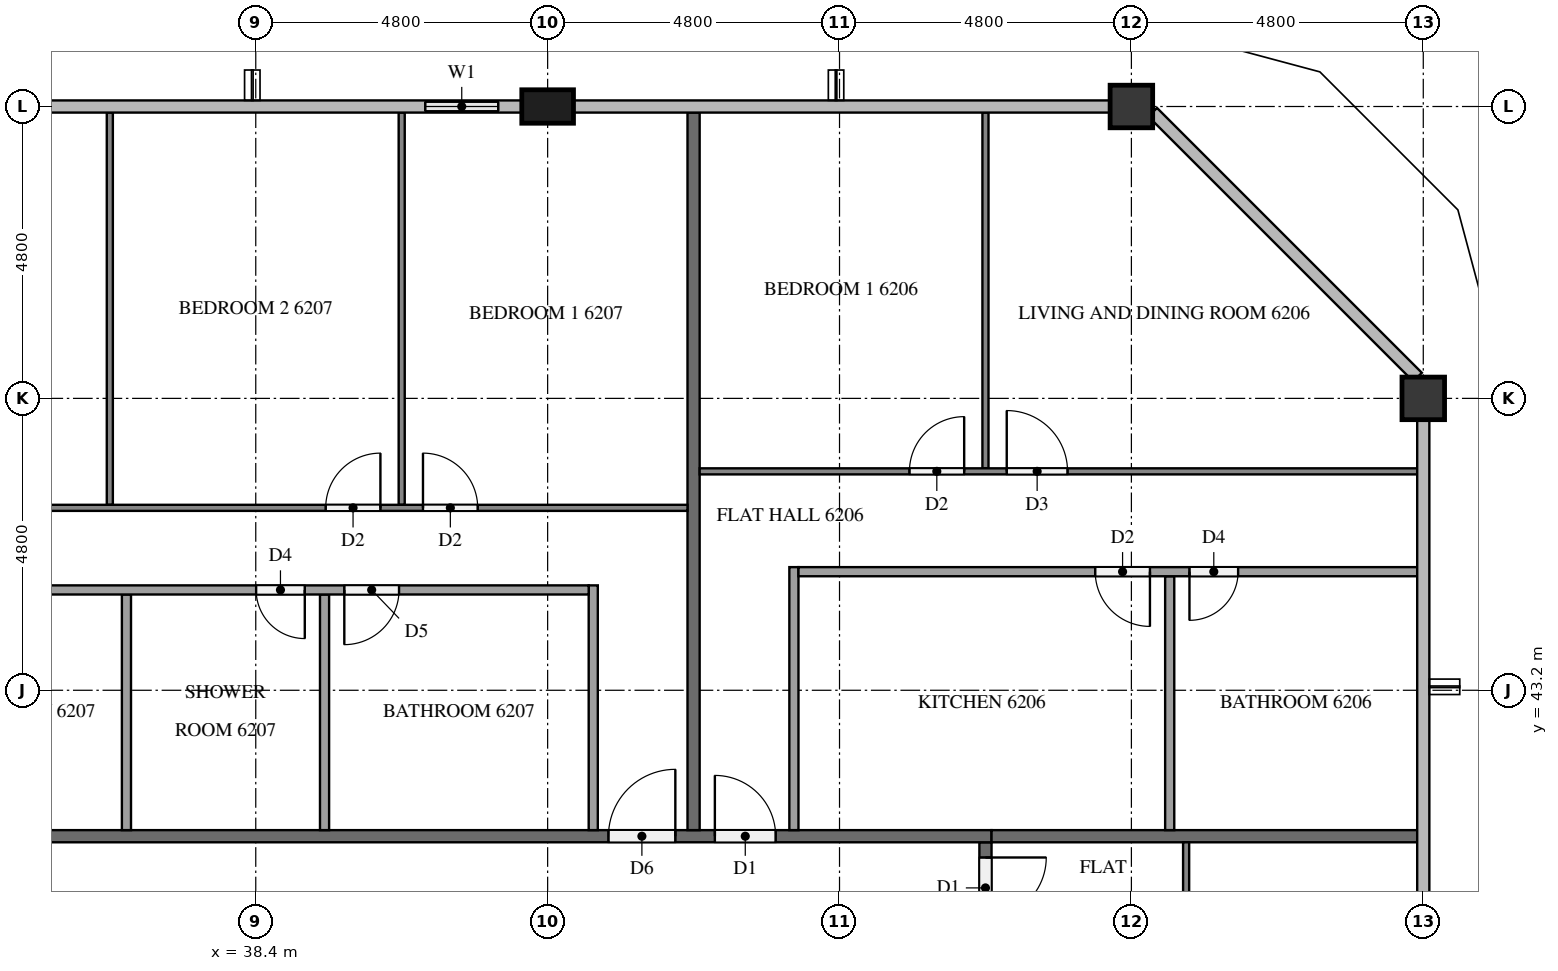
"""IFC4 building model, lengths in metres.
Left out: names, types, materials, properties, quantities, classifications, styles, units other than length and angle.
Written with IfcOpenShell. Run it as: python <this file> out.ifc"""

import sys

from ifc_helpers import new_model, si_unit, direction, frame, frame_2d, origin, origin_2d, place, context, subcontext, project, spatial, rectangle, extrude, element, fill, save


model = new_model("IFC4")
c1 = context("Model", 3, precision=1e-05, world=origin(), true_north=direction((0.0, 1.0)))
c2 = subcontext(c1, "Body", "Model", "MODEL_VIEW")
j1 = project(units=[si_unit("LENGTHUNIT", "METRE"), si_unit("PLANEANGLEUNIT", "RADIAN")], contexts=[c1])
p1 = place(None, origin())
s1 = spatial("IfcSite", under=j1, at=p1, CompositionType="ELEMENT")
p2 = place(p1, origin())
s2 = spatial("IfcBuilding", under=s1, at=p2, CompositionType="ELEMENT")
p3 = place(p2, frame((0.0, 0.0, 238.7)))
s3 = spatial("IfcBuildingStorey", under=s2, at=p3, CompositionType="ELEMENT", Elevation=238.7)
for number, where, z_axis, x_axis in (
    (1, (57.6, 48.0, 0.0), (0.0, 0.0, 1.0), (1.0, 0.0, 0.0)),
    (2, (52.8, 52.8, 0.0), (0.0, 0.0, 1.0), (1.0, 0.0, 0.0)),
):
    element("IfcColumn", number, at=place(p3, frame(where, z_axis=z_axis, x_axis=x_axis)), inside=s3, PredefinedType="COLUMN", context=c2, shape_type="SweptSolid", body=[
        extrude(rectangle(XDim=0.7, YDim=0.7, at=origin_2d()), origin(), (0.0, 0.0, 1.0), 3.2),
    ])
p4 = place(p3, frame((43.2, 52.8, 0.0), z_axis=(0.0, 0.0, 1.0), x_axis=(1.0, 0.0, 0.0)))
e3 = element("IfcColumn", 3, at=p4, inside=s3, PredefinedType="COLUMN", context=c2, shape_type="SweptSolid", body=[
    extrude(rectangle(XDim=0.85, YDim=0.55, at=origin_2d()), origin(), (0.0, 0.0, 1.0), 3.2),
])
p5 = place(p3, frame((42.775, 52.8, 0.0), z_axis=(0.0, 0.0, 1.0), x_axis=(-1.0, 0.0, 0.0)))
e4 = element("IfcWall", 4, at=p5, inside=s3, PredefinedType="SOLIDWALL", context=c2, shape_type="SweptSolid", body=[
    extrude(rectangle(XDim=1.975, YDim=0.15, at=frame_2d((0.987, 0.0))), origin(), (0.0, 0.0, 1.0), 3.2),
])
p6 = place(p5, frame((0.387, 0.0, 0.9)))
e5 = element("IfcOpeningElement", 5, at=p6, cuts=e4, PredefinedType="OPENING", context=c2, shape_type="SweptSolid", body=[
    extrude(rectangle(XDim=1.2, YDim=1.4, at=frame_2d((0.6, 0.7))), frame((0.0, 0.085, 0.0), z_axis=(0.0, -1.0, 0.0), x_axis=(1.0, 0.0, 0.0)), (0.0, 0.0, 1.0), 0.17),
])
p7 = place(p3, frame((50.4, 40.7, 0.0), z_axis=(0.0, 0.0, 1.0), x_axis=(0.0, -1.0, 0.0)))
e6 = element("IfcWall", 6, at=p7, inside=s3, PredefinedType="PARTITIONING", context=c2, shape_type="SweptSolid", body=[
    extrude(rectangle(XDim=28.6, YDim=0.2, at=frame_2d((14.3, 0.0))), origin(), (0.0, 0.0, 1.0), 3.2),
])
p8 = place(p7, frame((27.3, 0.0, 0.0)))
e7 = element("IfcOpeningElement", 7, at=p8, cuts=e6, PredefinedType="OPENING", context=c2, shape_type="SweptSolid", body=[
    extrude(rectangle(XDim=1.1, YDim=2.1, at=frame_2d((0.55, 1.05))), frame((0.0, 0.11, 0.0), z_axis=(0.0, -1.0, 0.0), x_axis=(1.0, 0.0, 0.0)), (0.0, 0.0, 1.0), 0.22),
])
p9 = place(p7, frame((0.25, 0.0, 0.0)))
e8 = element("IfcOpeningElement", 8, at=p9, cuts=e6, PredefinedType="OPENING", context=c2, shape_type="SweptSolid", body=[
    extrude(rectangle(XDim=1.0, YDim=2.1, at=frame_2d((0.5, 1.05))), frame((0.0, 0.11, 0.0), z_axis=(0.0, -1.0, 0.0), x_axis=(1.0, 0.0, 0.0)), (0.0, 0.0, 1.0), 0.22),
])
p10 = place(p3, frame((11.9, 40.8, 0.0), z_axis=(0.0, 0.0, 1.0), x_axis=(1.0, 0.0, 0.0)))
e9 = element("IfcWall", 9, at=p10, inside=s3, PredefinedType="PARTITIONING", context=c2, shape_type="SweptSolid", body=[
    extrude(rectangle(XDim=38.6, YDim=0.2, at=frame_2d((19.3, 0.0))), origin(), (0.0, 0.0, 1.0), 3.2),
])
p11 = place(p10, frame((34.05, 0.0, 0.0)))
e10 = element("IfcOpeningElement", 10, at=p11, cuts=e9, PredefinedType="OPENING", context=c2, shape_type="SweptSolid", body=[
    extrude(rectangle(XDim=1.0, YDim=2.1, at=frame_2d((0.5, 1.05))), frame((0.0, 0.11, 0.0), z_axis=(0.0, -1.0, 0.0), x_axis=(1.0, 0.0, 0.0)), (0.0, 0.0, 1.0), 0.22),
])
p12 = place(p10, frame((32.3, 0.0, 0.0)))
e11 = element("IfcOpeningElement", 11, at=p12, cuts=e9, PredefinedType="OPENING", context=c2, shape_type="SweptSolid", body=[
    extrude(rectangle(XDim=1.1, YDim=2.1, at=frame_2d((0.55, 1.05))), frame((0.0, 0.11, 0.0), z_axis=(0.0, -1.0, 0.0), x_axis=(1.0, 0.0, 0.0)), (0.0, 0.0, 1.0), 0.22),
])
p13 = place(p10, frame((2.85, 0.0, 0.0)))
e12 = element("IfcOpeningElement", 12, at=p13, cuts=e9, PredefinedType="OPENING", context=c2, shape_type="SweptSolid", body=[
    extrude(rectangle(XDim=1.0, YDim=2.1, at=frame_2d((0.5, 1.05))), frame((0.0, 0.11, 0.0), z_axis=(0.0, -1.0, 0.0), x_axis=(1.0, 0.0, 0.0)), (0.0, 0.0, 1.0), 0.22),
])
p14 = place(p10, frame((1.15, 0.0, 0.0)))
e13 = element("IfcOpeningElement", 13, at=p14, cuts=e9, PredefinedType="OPENING", context=c2, shape_type="SweptSolid", body=[
    extrude(rectangle(XDim=1.0, YDim=2.1, at=frame_2d((0.5, 1.05))), frame((0.0, 0.11, 0.0), z_axis=(0.0, -1.0, 0.0), x_axis=(1.0, 0.0, 0.0)), (0.0, 0.0, 1.0), 0.22),
])
p15 = place(p3, frame((50.5, 40.8, 0.0), z_axis=(0.0, 0.0, 1.0), x_axis=(1.0, 0.0, 0.0)))
e14 = element("IfcWall", 14, at=p15, inside=s3, PredefinedType="PARTITIONING", context=c2, shape_type="SweptSolid", body=[
    extrude(rectangle(XDim=7.0, YDim=0.2, at=frame_2d((3.5, 0.0))), origin(), (0.0, 0.0, 1.0), 3.2),
])
p16 = place(p3, frame((45.6, 52.7, 0.0), z_axis=(0.0, 0.0, 1.0), x_axis=(0.0, -1.0, 0.0)))
e15 = element("IfcWall", 15, at=p16, inside=s3, PredefinedType="PARTITIONING", context=c2, shape_type="SweptSolid", body=[
    extrude(rectangle(XDim=11.8, YDim=0.2, at=frame_2d((5.9, 0.0))), origin(), (0.0, 0.0, 1.0), 3.2),
])
p17 = place(p3, frame((53.7, 40.7, 0.0), z_axis=(0.0, 0.0, 1.0), x_axis=(0.0, -1.0, 0.0)))
e16 = element("IfcWall", 16, at=p17, inside=s3, PredefinedType="PARTITIONING", context=c2, shape_type="SweptSolid", body=[
    extrude(rectangle(XDim=9.4, YDim=0.1, at=frame_2d((4.7, 0.0))), origin(), (0.0, 0.0, 1.0), 3.2),
])
p18 = place(p17, frame((3.45, 0.0, 0.0)))
e17 = element("IfcOpeningElement", 17, at=p18, cuts=e16, PredefinedType="OPENING", context=c2, shape_type="SweptSolid", body=[
    extrude(rectangle(XDim=0.9, YDim=2.1, at=frame_2d((0.45, 1.05))), frame((0.0, 0.06, 0.0), z_axis=(0.0, -1.0, 0.0), x_axis=(1.0, 0.0, 0.0)), (0.0, 0.0, 1.0), 0.12),
])
p19 = place(p17, frame((5.05, 0.0, 0.0)))
e18 = element("IfcOpeningElement", 18, at=p19, cuts=e16, PredefinedType="OPENING", context=c2, shape_type="SweptSolid", body=[
    extrude(rectangle(XDim=1.0, YDim=2.1, at=frame_2d((0.5, 1.05))), frame((0.0, 0.06, 0.0), z_axis=(0.0, -1.0, 0.0), x_axis=(1.0, 0.0, 0.0)), (0.0, 0.0, 1.0), 0.12),
])
p20 = place(p3, frame((50.4, 46.85, 0.0), z_axis=(0.0, 0.0, 1.0), x_axis=(0.0, 1.0, 0.0)))
e19 = element("IfcWall", 19, at=p20, inside=s3, PredefinedType="PARTITIONING", context=c2, shape_type="SweptSolid", body=[
    extrude(rectangle(XDim=5.85, YDim=0.1, at=frame_2d((2.925, 0.0))), origin(), (0.0, 0.0, 1.0), 3.2),
])
p21 = place(p3, frame((45.7, 46.8, 0.0), z_axis=(0.0, 0.0, 1.0), x_axis=(1.0, 0.0, 0.0)))
e20 = element("IfcWall", 20, at=p21, inside=s3, PredefinedType="PARTITIONING", context=c2, shape_type="SweptSolid", body=[
    extrude(rectangle(XDim=11.8, YDim=0.1, at=frame_2d((5.9, 0.0))), origin(), (0.0, 0.0, 1.0), 3.2),
])
p22 = place(p21, frame((3.45, 0.0, 0.0)))
e21 = element("IfcOpeningElement", 21, at=p22, cuts=e20, PredefinedType="OPENING", context=c2, shape_type="SweptSolid", body=[
    extrude(rectangle(XDim=0.9, YDim=2.1, at=frame_2d((0.45, 1.05))), frame((0.0, 0.06, 0.0), z_axis=(0.0, -1.0, 0.0), x_axis=(1.0, 0.0, 0.0)), (0.0, 0.0, 1.0), 0.12),
])
p23 = place(p21, frame((5.05, 0.0, 0.0)))
e22 = element("IfcOpeningElement", 22, at=p23, cuts=e20, PredefinedType="OPENING", context=c2, shape_type="SweptSolid", body=[
    extrude(rectangle(XDim=1.0, YDim=2.1, at=frame_2d((0.5, 1.05))), frame((0.0, 0.06, 0.0), z_axis=(0.0, -1.0, 0.0), x_axis=(1.0, 0.0, 0.0)), (0.0, 0.0, 1.0), 0.12),
])
p24 = place(p3, frame((53.43, 40.9, 0.0), z_axis=(0.0, 0.0, 1.0), x_axis=(0.0, 1.0, 0.0)))
e23 = element("IfcWall", 23, at=p24, inside=s3, PredefinedType="PARTITIONING", context=c2, shape_type="SweptSolid", body=[
    extrude(rectangle(XDim=4.175, YDim=0.15, at=frame_2d((2.087, 0.0))), origin(), (0.0, 0.0, 1.0), 3.2),
])
p25 = place(p3, frame((47.25, 40.9, 0.0), z_axis=(0.0, 0.0, 1.0), x_axis=(0.0, 1.0, 0.0)))
e24 = element("IfcWall", 24, at=p25, inside=s3, PredefinedType="PARTITIONING", context=c2, shape_type="SweptSolid", body=[
    extrude(rectangle(XDim=4.325, YDim=0.15, at=frame_2d((2.163, 0.0))), origin(), (0.0, 0.0, 1.0), 3.2),
])
p26 = place(p3, frame((57.5, 45.15, 0.0), z_axis=(0.0, 0.0, 1.0), x_axis=(-1.0, 0.0, 0.0)))
e25 = element("IfcWall", 25, at=p26, inside=s3, PredefinedType="PARTITIONING", context=c2, shape_type="SweptSolid", body=[
    extrude(rectangle(XDim=10.175, YDim=0.15, at=frame_2d((5.087, 0.0))), origin(), (0.0, 0.0, 1.0), 3.2),
])
p27 = place(p26, frame((4.395, 0.0, 0.0)))
e26 = element("IfcOpeningElement", 26, at=p27, cuts=e25, PredefinedType="OPENING", context=c2, shape_type="SweptSolid", body=[
    extrude(rectangle(XDim=0.9, YDim=2.1, at=frame_2d((0.45, 1.05))), frame((0.0, 0.085, 0.0), z_axis=(0.0, -1.0, 0.0), x_axis=(1.0, 0.0, 0.0)), (0.0, 0.0, 1.0), 0.17),
])
p28 = place(p26, frame((2.945, 0.0, 0.0)))
e27 = element("IfcOpeningElement", 27, at=p28, cuts=e25, PredefinedType="OPENING", context=c2, shape_type="SweptSolid", body=[
    extrude(rectangle(XDim=0.8, YDim=2.1, at=frame_2d((0.4, 1.05))), frame((0.0, 0.085, 0.0), z_axis=(0.0, -1.0, 0.0), x_axis=(1.0, 0.0, 0.0)), (0.0, 0.0, 1.0), 0.17),
])
for number, where, z_axis, x_axis in (
    (28, (40.8, 46.25, 0.0), (0.0, 0.0, 1.0), (0.0, 1.0, 0.0)),
    (29, (36.0, 46.25, 0.0), (0.0, 0.0, 1.0), (0.0, 1.0, 0.0)),
):
    element("IfcWall", number, at=place(p3, frame(where, z_axis=z_axis, x_axis=x_axis)), inside=s3, PredefinedType="PARTITIONING", context=c2, shape_type="SweptSolid", body=[
        extrude(rectangle(XDim=6.45, YDim=0.1, at=frame_2d((3.225, 0.0))), origin(), (0.0, 0.0, 1.0), 3.2),
    ])
p29 = place(p3, frame((26.5, 46.2, 0.0), z_axis=(0.0, 0.0, 1.0), x_axis=(1.0, 0.0, 0.0)))
e30 = element("IfcWall", 30, at=p29, inside=s3, PredefinedType="PARTITIONING", context=c2, shape_type="SweptSolid", body=[
    extrude(rectangle(XDim=19.0, YDim=0.1, at=frame_2d((9.5, 0.0))), origin(), (0.0, 0.0, 1.0), 3.2),
])
p30 = place(p29, frame((14.65, 0.0, 0.0)))
e31 = element("IfcOpeningElement", 31, at=p30, cuts=e30, PredefinedType="OPENING", context=c2, shape_type="SweptSolid", body=[
    extrude(rectangle(XDim=0.9, YDim=2.1, at=frame_2d((0.45, 1.05))), frame((0.0, 0.06, 0.0), z_axis=(0.0, -1.0, 0.0), x_axis=(1.0, 0.0, 0.0)), (0.0, 0.0, 1.0), 0.12),
])
p31 = place(p29, frame((13.05, 0.0, 0.0)))
e32 = element("IfcOpeningElement", 32, at=p31, cuts=e30, PredefinedType="OPENING", context=c2, shape_type="SweptSolid", body=[
    extrude(rectangle(XDim=0.9, YDim=2.1, at=frame_2d((0.45, 1.05))), frame((0.0, 0.06, 0.0), z_axis=(0.0, -1.0, 0.0), x_axis=(1.0, 0.0, 0.0)), (0.0, 0.0, 1.0), 0.12),
])
p32 = place(p29, frame((5.05, 0.0, 0.0)))
e33 = element("IfcOpeningElement", 33, at=p32, cuts=e30, PredefinedType="OPENING", context=c2, shape_type="SweptSolid", body=[
    extrude(rectangle(XDim=0.9, YDim=2.1, at=frame_2d((0.45, 1.05))), frame((0.0, 0.06, 0.0), z_axis=(0.0, -1.0, 0.0), x_axis=(1.0, 0.0, 0.0)), (0.0, 0.0, 1.0), 0.12),
])
p33 = place(p29, frame((3.35, 0.0, 0.0)))
e34 = element("IfcOpeningElement", 34, at=p33, cuts=e30, PredefinedType="OPENING", context=c2, shape_type="SweptSolid", body=[
    extrude(rectangle(XDim=1.0, YDim=2.1, at=frame_2d((0.5, 1.05))), frame((0.0, 0.06, 0.0), z_axis=(0.0, -1.0, 0.0), x_axis=(1.0, 0.0, 0.0)), (0.0, 0.0, 1.0), 0.12),
])
for number, where, z_axis, x_axis in (
    (35, (39.531, 40.9, 0.0), (0.0, 0.0, 1.0), (0.0, 1.0, 0.0)),
    (36, (36.273, 40.9, 0.0), (0.0, 0.0, 1.0), (0.0, 1.0, 0.0)),
):
    element("IfcWall", number, at=place(p3, frame(where, z_axis=z_axis, x_axis=x_axis)), inside=s3, PredefinedType="PARTITIONING", context=c2, shape_type="SweptSolid", body=[
        extrude(rectangle(XDim=3.875, YDim=0.15, at=frame_2d((1.938, 0.0))), origin(), (0.0, 0.0, 1.0), 3.2),
    ])
p34 = place(p3, frame((43.95, 40.9, 0.0), z_axis=(0.0, 0.0, 1.0), x_axis=(0.0, 1.0, 0.0)))
e37 = element("IfcWall", 37, at=p34, inside=s3, PredefinedType="PARTITIONING", context=c2, shape_type="SweptSolid", body=[
    extrude(rectangle(XDim=4.025, YDim=0.15, at=frame_2d((2.013, 0.0))), origin(), (0.0, 0.0, 1.0), 3.2),
])
p35 = place(p3, frame((43.875, 44.85, 0.0), z_axis=(0.0, 0.0, 1.0), x_axis=(-1.0, 0.0, 0.0)))
e38 = element("IfcWall", 38, at=p35, inside=s3, PredefinedType="PARTITIONING", context=c2, shape_type="SweptSolid", body=[
    extrude(rectangle(XDim=17.375, YDim=0.15, at=frame_2d((8.688, 0.0))), origin(), (0.0, 0.0, 1.0), 3.2),
])
p36 = place(p35, frame((3.119, 0.0, 0.0)))
e39 = element("IfcOpeningElement", 39, at=p36, cuts=e38, PredefinedType="OPENING", context=c2, shape_type="SweptSolid", body=[
    extrude(rectangle(XDim=0.9, YDim=2.1, at=frame_2d((0.45, 1.05))), frame((0.0, 0.085, 0.0), z_axis=(0.0, -1.0, 0.0), x_axis=(1.0, 0.0, 0.0)), (0.0, 0.0, 1.0), 0.17),
])
p37 = place(p35, frame((4.669, 0.0, 0.0)))
e40 = element("IfcOpeningElement", 40, at=p37, cuts=e38, PredefinedType="OPENING", context=c2, shape_type="SweptSolid", body=[
    extrude(rectangle(XDim=0.8, YDim=2.1, at=frame_2d((0.4, 1.05))), frame((0.0, 0.085, 0.0), z_axis=(0.0, -1.0, 0.0), x_axis=(1.0, 0.0, 0.0)), (0.0, 0.0, 1.0), 0.17),
])
p38 = place(p35, frame((9.734, 0.0, 0.0)))
e41 = element("IfcOpeningElement", 41, at=p38, cuts=e38, PredefinedType="OPENING", context=c2, shape_type="SweptSolid", body=[
    extrude(rectangle(XDim=0.8, YDim=2.1, at=frame_2d((0.4, 1.05))), frame((0.0, 0.085, 0.0), z_axis=(0.0, -1.0, 0.0), x_axis=(1.0, 0.0, 0.0)), (0.0, 0.0, 1.0), 0.17),
])
p39 = place(p35, frame((11.184, 0.0, 0.0)))
e42 = element("IfcOpeningElement", 42, at=p39, cuts=e38, PredefinedType="OPENING", context=c2, shape_type="SweptSolid", body=[
    extrude(rectangle(XDim=0.9, YDim=2.1, at=frame_2d((0.45, 1.05))), frame((0.0, 0.085, 0.0), z_axis=(0.0, -1.0, 0.0), x_axis=(1.0, 0.0, 0.0)), (0.0, 0.0, 1.0), 0.17),
])
p40 = place(p6, origin())
e43 = element("IfcWindow", 43, at=p40, inside=s3, PartitioningType="SINGLE_PANEL", PredefinedType="WINDOW", context=c2, shape_type="SweptSolid", body=[
    extrude(rectangle(XDim=1.2, YDim=1.4, at=frame_2d((0.6, 0.7))), frame((0.0, 0.03, 0.0), z_axis=(0.0, -1.0, 0.0), x_axis=(1.0, 0.0, 0.0)), (0.0, 0.0, 1.0), 0.06),
])
fill(e5, e43)
p41 = place(p9, origin())
e44 = element("IfcDoor", 44, at=p41, inside=s3, OperationType="SINGLE_SWING_LEFT", PredefinedType="DOOR", context=c2, shape_type="SweptSolid", body=[
    extrude(rectangle(XDim=1.0, YDim=2.1, at=frame_2d((0.5, 1.05))), frame((0.0, 0.025, 0.0), z_axis=(0.0, -1.0, 0.0), x_axis=(1.0, 0.0, 0.0)), (0.0, 0.0, 1.0), 0.05),
])
fill(e8, e44)
p42 = place(p11, origin())
e45 = element("IfcDoor", 45, at=p42, inside=s3, OperationType="SINGLE_SWING_LEFT", PredefinedType="DOOR", context=c2, shape_type="SweptSolid", body=[
    extrude(rectangle(XDim=1.0, YDim=2.1, at=frame_2d((0.5, 1.05))), frame((0.0, 0.025, 0.0), z_axis=(0.0, -1.0, 0.0), x_axis=(1.0, 0.0, 0.0)), (0.0, 0.0, 1.0), 0.05),
])
fill(e10, e45)
p43 = place(p12, origin())
e46 = element("IfcDoor", 46, at=p43, inside=s3, OperationType="SINGLE_SWING_RIGHT", PredefinedType="DOOR", context=c2, shape_type="SweptSolid", body=[
    extrude(rectangle(XDim=1.1, YDim=2.1, at=frame_2d((0.55, 1.05))), frame((0.0, 0.025, 0.0), z_axis=(0.0, -1.0, 0.0), x_axis=(1.0, 0.0, 0.0)), (0.0, 0.0, 1.0), 0.05),
])
fill(e11, e46)
p44 = place(p22, origin())
e47 = element("IfcDoor", 47, at=p44, inside=s3, OperationType="SINGLE_SWING_RIGHT", PredefinedType="DOOR", context=c2, shape_type="SweptSolid", body=[
    extrude(rectangle(XDim=0.9, YDim=2.1, at=frame_2d((0.45, 1.05))), frame((0.0, 0.025, 0.0), z_axis=(0.0, -1.0, 0.0), x_axis=(1.0, 0.0, 0.0)), (0.0, 0.0, 1.0), 0.05),
])
fill(e21, e47)
p45 = place(p23, origin())
e48 = element("IfcDoor", 48, at=p45, inside=s3, OperationType="SINGLE_SWING_LEFT", PredefinedType="DOOR", context=c2, shape_type="SweptSolid", body=[
    extrude(rectangle(XDim=1.0, YDim=2.1, at=frame_2d((0.5, 1.05))), frame((0.0, 0.025, 0.0), z_axis=(0.0, -1.0, 0.0), x_axis=(1.0, 0.0, 0.0)), (0.0, 0.0, 1.0), 0.05),
])
fill(e22, e48)
p46 = place(p27, origin())
e49 = element("IfcDoor", 49, at=p46, inside=s3, OperationType="SINGLE_SWING_LEFT", PredefinedType="DOOR", context=c2, shape_type="SweptSolid", body=[
    extrude(rectangle(XDim=0.9, YDim=2.1, at=frame_2d((0.45, 1.05))), frame((0.0, 0.025, 0.0), z_axis=(0.0, -1.0, 0.0), x_axis=(1.0, 0.0, 0.0)), (0.0, 0.0, 1.0), 0.05),
])
fill(e26, e49)
p47 = place(p28, origin())
e50 = element("IfcDoor", 50, at=p47, inside=s3, OperationType="SINGLE_SWING_RIGHT", PredefinedType="DOOR", context=c2, shape_type="SweptSolid", body=[
    extrude(rectangle(XDim=0.8, YDim=2.1, at=frame_2d((0.4, 1.05))), frame((0.0, 0.025, 0.0), z_axis=(0.0, -1.0, 0.0), x_axis=(1.0, 0.0, 0.0)), (0.0, 0.0, 1.0), 0.05),
])
fill(e27, e50)
p48 = place(p30, origin())
e51 = element("IfcDoor", 51, at=p48, inside=s3, OperationType="SINGLE_SWING_LEFT", PredefinedType="DOOR", context=c2, shape_type="SweptSolid", body=[
    extrude(rectangle(XDim=0.9, YDim=2.1, at=frame_2d((0.45, 1.05))), frame((0.0, 0.025, 0.0), z_axis=(0.0, -1.0, 0.0), x_axis=(1.0, 0.0, 0.0)), (0.0, 0.0, 1.0), 0.05),
])
fill(e31, e51)
p49 = place(p31, origin())
e52 = element("IfcDoor", 52, at=p49, inside=s3, OperationType="SINGLE_SWING_RIGHT", PredefinedType="DOOR", context=c2, shape_type="SweptSolid", body=[
    extrude(rectangle(XDim=0.9, YDim=2.1, at=frame_2d((0.45, 1.05))), frame((0.0, 0.025, 0.0), z_axis=(0.0, -1.0, 0.0), x_axis=(1.0, 0.0, 0.0)), (0.0, 0.0, 1.0), 0.05),
])
fill(e32, e52)
p50 = place(p36, origin())
e53 = element("IfcDoor", 53, at=p50, inside=s3, OperationType="SINGLE_SWING_RIGHT", PredefinedType="DOOR", context=c2, shape_type="SweptSolid", body=[
    extrude(rectangle(XDim=0.9, YDim=2.1, at=frame_2d((0.45, 1.05))), frame((0.0, 0.025, 0.0), z_axis=(0.0, -1.0, 0.0), x_axis=(1.0, 0.0, 0.0)), (0.0, 0.0, 1.0), 0.05),
])
fill(e39, e53)
p51 = place(p37, origin())
e54 = element("IfcDoor", 54, at=p51, inside=s3, OperationType="SINGLE_SWING_LEFT", PredefinedType="DOOR", context=c2, shape_type="SweptSolid", body=[
    extrude(rectangle(XDim=0.8, YDim=2.1, at=frame_2d((0.4, 1.05))), frame((0.0, 0.025, 0.0), z_axis=(0.0, -1.0, 0.0), x_axis=(1.0, 0.0, 0.0)), (0.0, 0.0, 1.0), 0.05),
])
fill(e40, e54)
save(model, sys.argv[1])
